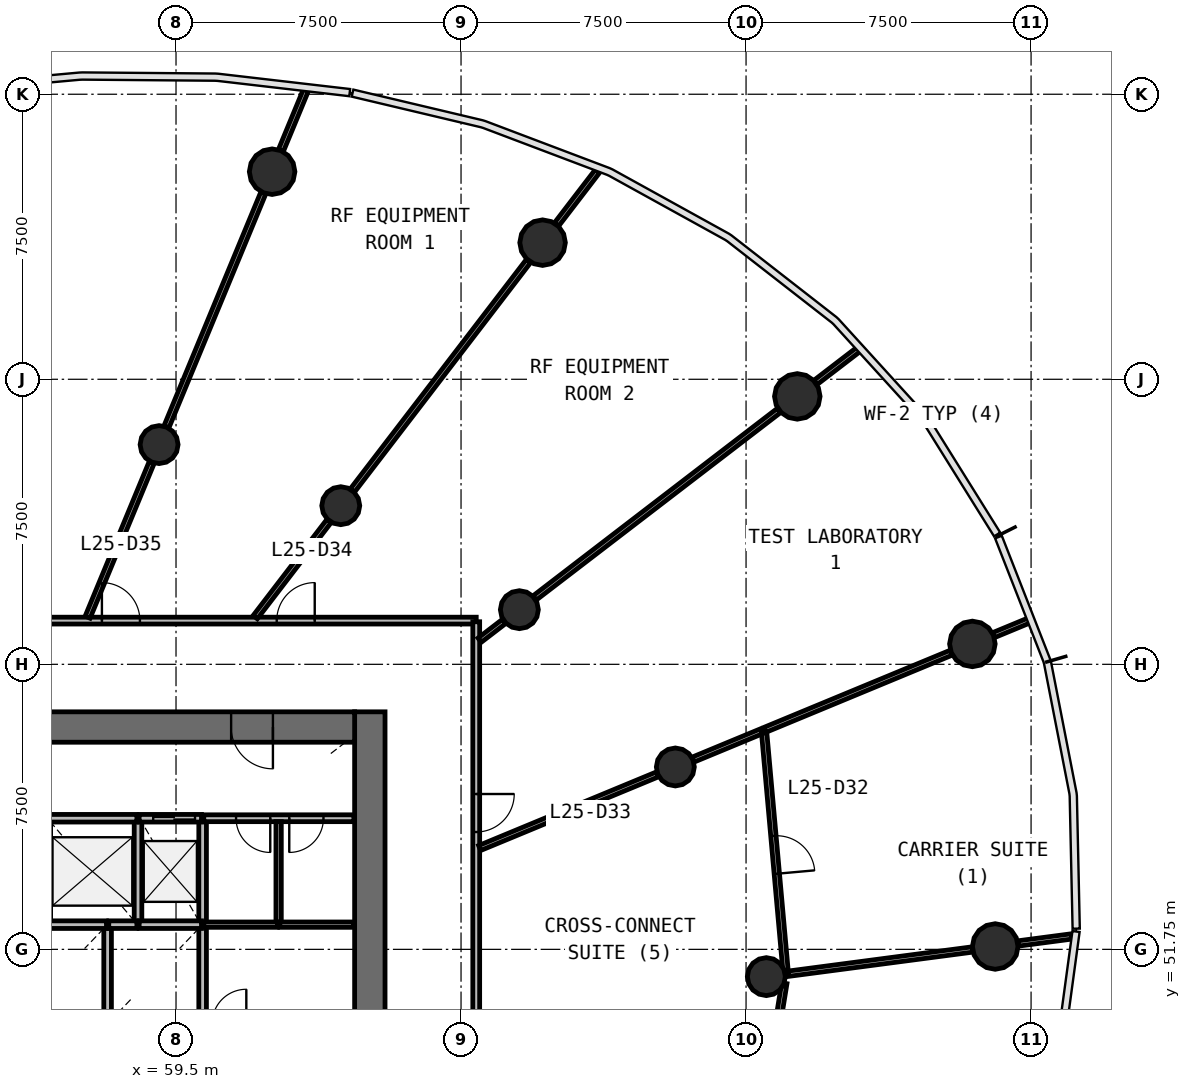
"""IFC4 building model, lengths in metres.
Left out: names, types, materials, properties, quantities, classifications, styles, units other than length and angle.
Written with IfcOpenShell. Run it as: python <this file> out.ifc"""

import sys

from ifc_helpers import new_model, si_unit, direction, frame, frame_2d, origin, origin_2d, place, context, subcontext, project, spatial, rectangle, circle, extrude, source, transform, mapped, element, fill, save


model = new_model("IFC4")
c1 = context("Model", 3, precision=1e-05, world=origin(), true_north=direction((0.0, 1.0)))
c2 = subcontext(c1, "Body", "Model", "MODEL_VIEW")
j1 = project(units=[si_unit("LENGTHUNIT", "METRE"), si_unit("PLANEANGLEUNIT", "RADIAN")], contexts=[c1])
p1 = place(None, origin())
s1 = spatial("IfcSite", under=j1, at=p1, CompositionType="ELEMENT")
p2 = place(p1, origin())
s2 = spatial("IfcBuilding", under=s1, at=p2, CompositionType="ELEMENT")
p3 = place(p2, frame((0.0, 0.0, 108.5)))
s3 = spatial("IfcBuildingStorey", under=s2, at=p3, CompositionType="ELEMENT", Elevation=108.5)
p4 = place(p3, frame((64.6, 38.0, 0.0), z_axis=(0.0, 0.0, 1.0), x_axis=(0.0, 1.0, 0.0)))
e1 = element("IfcWall", 1, at=p4, inside=s3, PredefinedType="SHEAR", context=c2, shape_type="SweptSolid", body=[
    extrude(rectangle(XDim=20.0, YDim=0.8, at=frame_2d((10.0, 0.0))), origin(), (0.0, 0.0, 1.0), 4.1),
])
p5 = place(p4, frame((9.1, 0.0, 0.0)))
e2 = element("IfcOpeningElement", 2, at=p5, cuts=e1, PredefinedType="OPENING", context=c2, shape_type="SweptSolid", body=[
    extrude(rectangle(XDim=1.8, YDim=2.1, at=frame_2d((0.9, 1.05))), frame((0.0, 0.41, 0.0), z_axis=(0.0, -1.0, 0.0), x_axis=(1.0, 0.0, 0.0)), (0.0, 0.0, 1.0), 0.82),
])
p6 = place(p3, frame((64.2, 57.6, 0.0), z_axis=(0.0, 0.0, 1.0), x_axis=(-1.0, 0.0, 0.0)))
e3 = element("IfcWall", 3, at=p6, inside=s3, PredefinedType="SHEAR", context=c2, shape_type="SweptSolid", body=[
    extrude(rectangle(XDim=24.4, YDim=0.8, at=frame_2d((12.2, 0.0))), origin(), (0.0, 0.0, 1.0), 4.1),
])
p7 = place(p6, frame((21.65, 0.0, 0.0)))
e4 = element("IfcOpeningElement", 4, at=p7, cuts=e3, PredefinedType="OPENING", context=c2, shape_type="SweptSolid", body=[
    extrude(rectangle(XDim=1.1, YDim=2.1, at=frame_2d((0.55, 1.05))), frame((0.0, 0.41, 0.0), z_axis=(0.0, -1.0, 0.0), x_axis=(1.0, 0.0, 0.0)), (0.0, 0.0, 1.0), 0.82),
])
p8 = place(p6, frame((2.15, 0.0, 0.0)))
e5 = element("IfcOpeningElement", 5, at=p8, cuts=e3, PredefinedType="OPENING", context=c2, shape_type="SweptSolid", body=[
    extrude(rectangle(XDim=1.1, YDim=2.1, at=frame_2d((0.55, 1.05))), frame((0.0, 0.41, 0.0), z_axis=(0.0, -1.0, 0.0), x_axis=(1.0, 0.0, 0.0)), (0.0, 0.0, 1.0), 0.82),
])
m1 = source(origin(), c2, "Body", "SweptSolid", [
    extrude(circle(Radius=0.6, at=origin_2d()), origin(), (0.0, 0.0, 1.0), 4.1),
])
for number, where, z_axis, x_axis in (
    (6, (81.056, 51.825, 0.0), (0.0, 0.0, 1.0), (1.0, 0.0, 0.0)),
    (7, (80.456, 59.787, 0.0), (0.0, 0.0, 1.0), (1.0, 0.0, 0.0)),
    (8, (75.848, 66.299, 0.0), (0.0, 0.0, 1.0), (1.0, 0.0, 0.0)),
    (9, (69.146, 70.345, 0.0), (0.0, 0.0, 1.0), (1.0, 0.0, 0.0)),
    (10, (62.029, 72.212, 0.0), (0.0, 0.0, 1.0), (1.0, 0.0, 0.0)),
):
    element("IfcColumn", number, at=place(p3, frame(where, z_axis=z_axis, x_axis=x_axis)), inside=s3, PredefinedType="COLUMN", context=c2, shape_type="MappedRepresentation", body=[
        mapped(m1, transform((0.0, 0.0, 0.0), scale=1.0)),
    ])
m2 = source(origin(), c2, "Body", "SweptSolid", [
    extrude(circle(Radius=0.5, at=origin_2d()), origin(), (0.0, 0.0, 1.0), 4.1),
])
for number, where, z_axis, x_axis in (
    (11, (75.034, 51.032, 0.0), (0.0, 0.0, 1.0), (1.0, 0.0, 0.0)),
    (12, (72.639, 56.549, 0.0), (0.0, 0.0, 1.0), (1.0, 0.0, 0.0)),
    (13, (68.535, 60.688, 0.0), (0.0, 0.0, 1.0), (1.0, 0.0, 0.0)),
    (14, (63.835, 63.424, 0.0), (0.0, 0.0, 1.0), (1.0, 0.0, 0.0)),
    (15, (59.055, 65.031, 0.0), (0.0, 0.0, 1.0), (1.0, 0.0, 0.0)),
):
    element("IfcColumn", number, at=place(p3, frame(where, z_axis=z_axis, x_axis=x_axis)), inside=s3, PredefinedType="COLUMN", context=c2, shape_type="MappedRepresentation", body=[
        mapped(m2, transform((0.0, 0.0, 0.0), scale=1.0)),
    ])
for number, where, z_axis, x_axis in (
    (16, (58.5, 52.4, 0.0), (0.0, 0.0, 1.0), (0.0, 1.0, 0.0)),
    (17, (60.2, 52.4, 0.0), (0.0, 0.0, 1.0), (0.0, 1.0, 0.0)),
):
    element("IfcWall", number, at=place(p3, frame(where, z_axis=z_axis, x_axis=x_axis)), inside=s3, PredefinedType="SOLIDWALL", context=c2, shape_type="SweptSolid", body=[
        extrude(rectangle(XDim=2.8, YDim=0.2, at=frame_2d((1.4, 0.0))), origin(), (0.0, 0.0, 1.0), 3.7),
    ])
p9 = place(p3, frame((58.47, 55.2, 0.0), z_axis=(0.0, 0.0, 1.0), x_axis=(-1.0, 0.0, 0.0)))
e18 = element("IfcWall", 18, at=p9, inside=s3, PredefinedType="SOLIDWALL", context=c2, shape_type="SweptSolid", body=[
    extrude(rectangle(XDim=2.34, YDim=0.2, at=frame_2d((1.17, 0.0))), origin(), (0.0, 0.0, 1.0), 3.7),
])
p10 = place(p3, frame((57.7, 50.01, 0.0), z_axis=(0.0, 0.0, 1.0), x_axis=(0.0, 1.0, 0.0)))
e19 = element("IfcWall", 19, at=p10, inside=s3, PredefinedType="SOLIDWALL", context=c2, shape_type="SweptSolid", body=[
    extrude(rectangle(XDim=2.39, YDim=0.2, at=frame_2d((1.195, 0.0))), origin(), (0.0, 0.0, 1.0), 3.7),
])
p11 = place(p3, frame((60.2, 50.01, 0.0), z_axis=(0.0, 0.0, 1.0), x_axis=(0.0, 1.0, 0.0)))
e20 = element("IfcWall", 20, at=p11, inside=s3, PredefinedType="SOLIDWALL", context=c2, shape_type="SweptSolid", body=[
    extrude(rectangle(XDim=2.36, YDim=0.2, at=frame_2d((1.18, 0.0))), origin(), (0.0, 0.0, 1.0), 3.7),
])
p12 = place(p3, frame((60.17, 52.4, 0.0), z_axis=(0.0, 0.0, 1.0), x_axis=(-1.0, 0.0, 0.0)))
e21 = element("IfcWall", 21, at=p12, inside=s3, PredefinedType="SOLIDWALL", context=c2, shape_type="SweptSolid", body=[
    extrude(rectangle(XDim=1.64, YDim=0.2, at=frame_2d((0.82, 0.0))), origin(), (0.0, 0.0, 1.0), 3.7),
])
p13 = place(p3, frame((60.17, 55.2, 0.0), z_axis=(0.0, 0.0, 1.0), x_axis=(-1.0, 0.0, 0.0)))
e22 = element("IfcWall", 22, at=p13, inside=s3, PredefinedType="SOLIDWALL", context=c2, shape_type="SweptSolid", body=[
    extrude(rectangle(XDim=1.64, YDim=0.2, at=frame_2d((0.82, 0.0))), origin(), (0.0, 0.0, 1.0), 3.7),
])
p14 = place(p13, frame((0.17, 0.0, 0.0)))
e23 = element("IfcOpeningElement", 23, at=p14, cuts=e22, PredefinedType="OPENING", context=c2, shape_type="SweptSolid", body=[
    extrude(rectangle(XDim=1.1, YDim=2.1, at=frame_2d((0.55, 1.05))), frame((0.0, 0.11, 0.0), z_axis=(0.0, -1.0, 0.0), x_axis=(1.0, 0.0, 0.0)), (0.0, 0.0, 1.0), 0.22),
])
p15 = place(p3, frame((57.67, 52.4, 0.0), z_axis=(0.0, 0.0, 1.0), x_axis=(-1.0, 0.0, 0.0)))
e24 = element("IfcWall", 24, at=p15, inside=s3, PredefinedType="SOLIDWALL", context=c2, shape_type="SweptSolid", body=[
    extrude(rectangle(XDim=1.54, YDim=0.2, at=frame_2d((0.77, 0.0))), origin(), (0.0, 0.0, 1.0), 3.7),
])
p16 = place(p3, frame((58.47, 52.4, 0.0), z_axis=(0.0, 0.0, 1.0), x_axis=(-1.0, 0.0, 0.0)))
e25 = element("IfcWall", 25, at=p16, inside=s3, PredefinedType="SOLIDWALL", context=c2, shape_type="SweptSolid", body=[
    extrude(rectangle(XDim=0.74, YDim=0.2, at=frame_2d((0.37, 0.0))), origin(), (0.0, 0.0, 1.0), 3.7),
])
p17 = place(p3, frame((36.6, 60.4, 0.0), z_axis=(0.0, 0.0, 1.0), x_axis=(1.0, 0.0, 0.0)))
e26 = element("IfcWall", 26, at=p17, inside=s3, PredefinedType="PARTITIONING", context=c2, shape_type="SweptSolid", body=[
    extrude(rectangle(XDim=30.8, YDim=0.18, at=frame_2d((15.4, 0.0))), origin(), (0.0, 0.0, 1.0), 2.9),
])
p18 = place(p17, frame((25.55, 0.0, 0.0)))
e27 = element("IfcOpeningElement", 27, at=p18, cuts=e26, PredefinedType="OPENING", context=c2, shape_type="SweptSolid", body=[
    extrude(rectangle(XDim=1.0, YDim=2.1, at=frame_2d((0.5, 1.05))), frame((0.0, 0.1, 0.0), z_axis=(0.0, -1.0, 0.0), x_axis=(1.0, 0.0, 0.0)), (0.0, 0.0, 1.0), 0.2),
])
p19 = place(p17, frame((20.95, 0.0, 0.0)))
e28 = element("IfcOpeningElement", 28, at=p19, cuts=e26, PredefinedType="OPENING", context=c2, shape_type="SweptSolid", body=[
    extrude(rectangle(XDim=1.0, YDim=2.1, at=frame_2d((0.5, 1.05))), frame((0.0, 0.1, 0.0), z_axis=(0.0, -1.0, 0.0), x_axis=(1.0, 0.0, 0.0)), (0.0, 0.0, 1.0), 0.2),
])
p20 = place(p17, frame((14.95, 0.0, 0.0)))
e29 = element("IfcOpeningElement", 29, at=p20, cuts=e26, PredefinedType="OPENING", context=c2, shape_type="SweptSolid", body=[
    extrude(rectangle(XDim=1.0, YDim=2.1, at=frame_2d((0.5, 1.05))), frame((0.0, 0.1, 0.0), z_axis=(0.0, -1.0, 0.0), x_axis=(1.0, 0.0, 0.0)), (0.0, 0.0, 1.0), 0.2),
])
p21 = place(p17, frame((8.95, 0.0, 0.0)))
e30 = element("IfcOpeningElement", 30, at=p21, cuts=e26, PredefinedType="OPENING", context=c2, shape_type="SweptSolid", body=[
    extrude(rectangle(XDim=1.0, YDim=2.1, at=frame_2d((0.5, 1.05))), frame((0.0, 0.1, 0.0), z_axis=(0.0, -1.0, 0.0), x_axis=(1.0, 0.0, 0.0)), (0.0, 0.0, 1.0), 0.2),
])
p22 = place(p3, frame((67.4, 60.37, 0.0), z_axis=(0.0, 0.0, 1.0), x_axis=(0.0, -1.0, 0.0)))
e31 = element("IfcWall", 31, at=p22, inside=s3, PredefinedType="PARTITIONING", context=c2, shape_type="SweptSolid", body=[
    extrude(rectangle(XDim=23.583, YDim=0.18, at=frame_2d((11.791, 0.0))), origin(), (0.0, 0.0, 1.0), 2.9),
])
p23 = place(p22, frame((14.732, 0.0, 0.0)))
e32 = element("IfcOpeningElement", 32, at=p23, cuts=e31, PredefinedType="OPENING", context=c2, shape_type="SweptSolid", body=[
    extrude(rectangle(XDim=1.0, YDim=2.1, at=frame_2d((0.5, 1.05))), frame((0.0, 0.1, 0.0), z_axis=(0.0, -1.0, 0.0), x_axis=(1.0, 0.0, 0.0)), (0.0, 0.0, 1.0), 0.2),
])
p24 = place(p22, frame((11.333, 0.0, 0.0)))
e33 = element("IfcOpeningElement", 33, at=p24, cuts=e31, PredefinedType="OPENING", context=c2, shape_type="SweptSolid", body=[
    extrude(rectangle(XDim=1.0, YDim=2.1, at=frame_2d((0.5, 1.05))), frame((0.0, 0.1, 0.0), z_axis=(0.0, -1.0, 0.0), x_axis=(1.0, 0.0, 0.0)), (0.0, 0.0, 1.0), 0.2),
])
p25 = place(p22, frame((4.532, 0.0, 0.0)))
e34 = element("IfcOpeningElement", 34, at=p25, cuts=e31, PredefinedType="OPENING", context=c2, shape_type="SweptSolid", body=[
    extrude(rectangle(XDim=1.0, YDim=2.1, at=frame_2d((0.5, 1.05))), frame((0.0, 0.1, 0.0), z_axis=(0.0, -1.0, 0.0), x_axis=(1.0, 0.0, 0.0)), (0.0, 0.0, 1.0), 0.2),
])
p26 = place(p3, frame((64.18, 55.2, 0.0), z_axis=(0.0, 0.0, 1.0), x_axis=(-1.0, 0.0, 0.0)))
e35 = element("IfcWall", 35, at=p26, inside=s3, PredefinedType="PARTITIONING", context=c2, shape_type="SweptSolid", body=[
    extrude(rectangle(XDim=3.95, YDim=0.18, at=frame_2d((1.975, 0.0))), origin(), (0.0, 0.0, 1.0), 3.7),
])
p27 = place(p26, frame((2.2, 0.0, 0.0)))
e36 = element("IfcOpeningElement", 36, at=p27, cuts=e35, PredefinedType="OPENING", context=c2, shape_type="SweptSolid", body=[
    extrude(rectangle(XDim=0.9, YDim=2.1, at=frame_2d((0.45, 1.05))), frame((0.0, 0.1, 0.0), z_axis=(0.0, -1.0, 0.0), x_axis=(1.0, 0.0, 0.0)), (0.0, 0.0, 1.0), 0.2),
])
p28 = place(p26, frame((0.8, 0.0, 0.0)))
e37 = element("IfcOpeningElement", 37, at=p28, cuts=e35, PredefinedType="OPENING", context=c2, shape_type="SweptSolid", body=[
    extrude(rectangle(XDim=0.9, YDim=2.1, at=frame_2d((0.45, 1.05))), frame((0.0, 0.1, 0.0), z_axis=(0.0, -1.0, 0.0), x_axis=(1.0, 0.0, 0.0)), (0.0, 0.0, 1.0), 0.2),
])
p29 = place(p3, frame((68.935, 60.995, 0.0), z_axis=(0.0, 0.0, 1.0), x_axis=(0.793358692504, 0.608754453805, 0.0)))
e38 = element("IfcWall", 38, at=p29, inside=s3, PredefinedType="PARTITIONING", context=c2, shape_type="SweptSolid", body=[
    extrude(rectangle(XDim=8.11, YDim=0.14, at=frame_2d((4.055, 0.0))), origin(), (0.0, 0.0, 1.0), 2.9),
])
p30 = place(p3, frame((64.142, 63.824, 0.0), z_axis=(0.0, 0.0, 1.0), x_axis=(0.608755907151, 0.793357577331, 0.0)))
e39 = element("IfcWall", 39, at=p30, inside=s3, PredefinedType="PARTITIONING", context=c2, shape_type="SweptSolid", body=[
    extrude(rectangle(XDim=7.615, YDim=0.14, at=frame_2d((3.808, 0.0))), origin(), (0.0, 0.0, 1.0), 2.9),
])
p31 = place(p3, frame((59.248, 65.498, 0.0), z_axis=(0.0, 0.0, 1.0), x_axis=(0.382696989205, 0.923873916968, 0.0)))
e40 = element("IfcWall", 40, at=p31, inside=s3, PredefinedType="PARTITIONING", context=c2, shape_type="SweptSolid", body=[
    extrude(rectangle(XDim=6.663, YDim=0.14, at=frame_2d((3.332, 0.0))), origin(), (0.0, 0.0, 1.0), 2.9),
])
p32 = place(p3, frame((74.97, 57.515, 0.0), z_axis=(0.0, 0.0, 1.0), x_axis=(0.089462467016, -0.995990194227, 0.0)))
e41 = element("IfcWall", 41, at=p32, inside=s3, PredefinedType="PARTITIONING", context=c2, shape_type="SweptSolid", body=[
    extrude(rectangle(XDim=6.44, YDim=0.14, at=frame_2d((3.22, 0.0))), origin(), (0.0, 0.0, 1.0), 2.9),
])
p33 = place(p32, frame((2.791, 0.0, 0.0)))
e42 = element("IfcOpeningElement", 42, at=p33, cuts=e41, PredefinedType="OPENING", context=c2, shape_type="SweptSolid", body=[
    extrude(rectangle(XDim=1.0, YDim=2.1, at=frame_2d((0.5, 1.05))), frame((0.0, 0.08, 0.0), z_axis=(0.0, -1.0, 0.0), x_axis=(1.0, 0.0, 0.0)), (0.0, 0.0, 1.0), 0.16),
])
p34 = place(p3, frame((75.507, 50.858, 0.0), z_axis=(0.0, 0.0, 1.0), x_axis=(-0.160052648202, -0.987108479248, 0.0)))
e43 = element("IfcWall", 43, at=p34, inside=s3, PredefinedType="PARTITIONING", context=c2, shape_type="SweptSolid", body=[
    extrude(rectangle(XDim=5.905, YDim=0.14, at=frame_2d((2.952, 0.0))), origin(), (0.0, 0.0, 1.0), 2.9),
])
p35 = place(p34, frame((2.455, 0.0, 0.0)))
e44 = element("IfcOpeningElement", 44, at=p35, cuts=e43, PredefinedType="OPENING", context=c2, shape_type="SweptSolid", body=[
    extrude(rectangle(XDim=1.0, YDim=2.1, at=frame_2d((0.5, 1.05))), frame((0.0, 0.08, 0.0), z_axis=(0.0, -1.0, 0.0), x_axis=(1.0, 0.0, 0.0)), (0.0, 0.0, 1.0), 0.16),
])
p36 = place(p3, frame((74.998, 57.526, 0.0), z_axis=(0.0, 0.0, 1.0), x_axis=(0.923875965801, 0.382692043051, 0.0)))
e45 = element("IfcWall", 45, at=p36, inside=s3, PredefinedType="PARTITIONING", context=c2, shape_type="SweptSolid", body=[
    extrude(rectangle(XDim=5.302, YDim=0.14, at=frame_2d((2.651, 0.0))), origin(), (0.0, 0.0, 1.0), 2.9),
])
p37 = place(p3, frame((67.49, 54.416, 0.0), z_axis=(0.0, 0.0, 1.0), x_axis=(0.923890025086, 0.382658100067, 0.0)))
e46 = element("IfcWall", 46, at=p37, inside=s3, PredefinedType="PARTITIONING", context=c2, shape_type="SweptSolid", body=[
    extrude(rectangle(XDim=5.068, YDim=0.14, at=frame_2d((2.534, 0.0))), origin(), (0.0, 0.0, 1.0), 2.9),
])
p38 = place(p3, frame((75.616, 51.109, 0.0), z_axis=(0.0, 0.0, 1.0), x_axis=(0.991441867731, 0.130548929177, 0.0)))
e47 = element("IfcWall", 47, at=p38, inside=s3, PredefinedType="PARTITIONING", context=c2, shape_type="SweptSolid", body=[
    extrude(rectangle(XDim=4.883, YDim=0.14, at=frame_2d((2.441, 0.0))), origin(), (0.0, 0.0, 1.0), 2.9),
])
p39 = place(p3, frame((57.174, 60.49, 0.0), z_axis=(0.0, 0.0, 1.0), x_axis=(0.382672831764, 0.923883923353, 0.0)))
e48 = element("IfcWall", 48, at=p39, inside=s3, PredefinedType="PARTITIONING", context=c2, shape_type="SweptSolid", body=[
    extrude(rectangle(XDim=4.41, YDim=0.14, at=frame_2d((2.205, 0.0))), origin(), (0.0, 0.0, 1.0), 2.9),
])
p40 = place(p3, frame((61.584, 60.49, 0.0), z_axis=(0.0, 0.0, 1.0), x_axis=(0.60874605662, 0.793365135703, 0.0)))
e49 = element("IfcWall", 49, at=p40, inside=s3, PredefinedType="PARTITIONING", context=c2, shape_type="SweptSolid", body=[
    extrude(rectangle(XDim=3.194, YDim=0.14, at=frame_2d((1.597, 0.0))), origin(), (0.0, 0.0, 1.0), 2.9),
])
p41 = place(p3, frame((62.2, 52.4, 0.0), z_axis=(0.0, 0.0, 1.0), x_axis=(0.0, 1.0, 0.0)))
e50 = element("IfcWall", 50, at=p41, inside=s3, PredefinedType="PARTITIONING", context=c2, shape_type="SweptSolid", body=[
    extrude(rectangle(XDim=2.71, YDim=0.14, at=frame_2d((1.355, 0.0))), origin(), (0.0, 0.0, 1.0), 2.9),
])
p42 = place(p3, frame((73.106, 56.742, 0.0), z_axis=(0.0, 0.0, 1.0), x_axis=(0.923843914347, 0.382769410904, 0.0)))
e51 = element("IfcWall", 51, at=p42, inside=s3, PredefinedType="PARTITIONING", context=c2, shape_type="SweptSolid", body=[
    extrude(rectangle(XDim=1.945, YDim=0.14, at=frame_2d((0.972, 0.0))), origin(), (0.0, 0.0, 1.0), 2.9),
])
p43 = place(p3, frame((62.17, 52.4, 0.0), z_axis=(0.0, 0.0, 1.0), x_axis=(-1.0, 0.0, 0.0)))
e52 = element("IfcWall", 52, at=p43, inside=s3, PredefinedType="PARTITIONING", context=c2, shape_type="SweptSolid", body=[
    extrude(rectangle(XDim=1.94, YDim=0.14, at=frame_2d((0.97, 0.0))), origin(), (0.0, 0.0, 1.0), 2.9),
])
p44 = place(p3, frame((64.18, 52.4, 0.0), z_axis=(0.0, 0.0, 1.0), x_axis=(-1.0, 0.0, 0.0)))
e53 = element("IfcWall", 53, at=p44, inside=s3, PredefinedType="PARTITIONING", context=c2, shape_type="SweptSolid", body=[
    extrude(rectangle(XDim=1.95, YDim=0.14, at=frame_2d((0.975, 0.0))), origin(), (0.0, 0.0, 1.0), 2.9),
])
p45 = place(p3, frame((69.514, 70.824, 0.0), z_axis=(0.0, 0.0, 1.0), x_axis=(0.608816765526, 0.793310876022, 0.0)))
e54 = element("IfcWall", 54, at=p45, inside=s3, PredefinedType="PARTITIONING", context=c2, shape_type="SweptSolid", body=[
    extrude(rectangle(XDim=1.769, YDim=0.14, at=frame_2d((0.885, 0.0))), origin(), (0.0, 0.0, 1.0), 2.9),
])
p46 = place(p3, frame((62.26, 72.771, 0.0), z_axis=(0.0, 0.0, 1.0), x_axis=(0.382769756697, 0.923843771077, 0.0)))
e55 = element("IfcWall", 55, at=p46, inside=s3, PredefinedType="PARTITIONING", context=c2, shape_type="SweptSolid", body=[
    extrude(rectangle(XDim=1.719, YDim=0.14, at=frame_2d((0.86, 0.0))), origin(), (0.0, 0.0, 1.0), 2.9),
])
p47 = place(p3, frame((76.328, 66.667, 0.0), z_axis=(0.0, 0.0, 1.0), x_axis=(0.793384012646, 0.608721453932, 0.0)))
e56 = element("IfcWall", 56, at=p47, inside=s3, PredefinedType="PARTITIONING", context=c2, shape_type="SweptSolid", body=[
    extrude(rectangle(XDim=1.432, YDim=0.14, at=frame_2d((0.716, 0.0))), origin(), (0.0, 0.0, 1.0), 2.9),
])
p48 = place(p3, frame((81.656, 51.904, 0.0), z_axis=(0.0, 0.0, 1.0), x_axis=(0.991440859851, 0.130556583206, 0.0)))
e57 = element("IfcWall", 57, at=p48, inside=s3, PredefinedType="PARTITIONING", context=c2, shape_type="SweptSolid", body=[
    extrude(rectangle(XDim=1.423, YDim=0.14, at=frame_2d((0.711, 0.0))), origin(), (0.0, 0.0, 1.0), 2.9),
])
p49 = place(p3, frame((81.014, 60.018, 0.0), z_axis=(0.0, 0.0, 1.0), x_axis=(0.923909071339, 0.38261211154, 0.0)))
e58 = element("IfcWall", 58, at=p49, inside=s3, PredefinedType="PARTITIONING", context=c2, shape_type="SweptSolid", body=[
    extrude(rectangle(XDim=1.021, YDim=0.14, at=frame_2d((0.511, 0.0))), origin(), (0.0, 0.0, 1.0), 2.9),
])
p50 = place(p3, frame((67.49, 59.886, 0.0), z_axis=(0.0, 0.0, 1.0), x_axis=(0.793316076519, 0.608809989025, 0.0)))
e59 = element("IfcWall", 59, at=p50, inside=s3, PredefinedType="PARTITIONING", context=c2, shape_type="SweptSolid", body=[
    extrude(rectangle(XDim=0.812, YDim=0.14, at=frame_2d((0.406, 0.0))), origin(), (0.0, 0.0, 1.0), 2.9),
])
m3 = source(origin(), c2, "Body", "SweptSolid", [
    extrude(rectangle(XDim=1.1, YDim=2.1, at=frame_2d((0.55, 1.05))), frame((0.0, 0.025, 0.0), z_axis=(0.0, -1.0, 0.0), x_axis=(1.0, 0.0, 0.0)), (0.0, 0.0, 1.0), 0.05),
])
p51 = place(p14, origin())
e60 = element("IfcDoor", 60, at=p51, inside=s3, OperationType="DOUBLE_DOOR_SLIDING", PredefinedType="USERDEFINED", context=c2, shape_type="MappedRepresentation", body=[
    mapped(m3, transform((0.0, 0.0, 0.0), scale=1.0)),
])
fill(e23, e60)
m4 = source(origin(), c2, "Body", "SweptSolid", [
    extrude(rectangle(XDim=1.1, YDim=2.1, at=frame_2d((0.55, 1.05))), frame((0.0, 0.025, 0.0), z_axis=(0.0, -1.0, 0.0), x_axis=(1.0, 0.0, 0.0)), (0.0, 0.0, 1.0), 0.05),
])
p52 = place(p8, origin())
e61 = element("IfcDoor", 61, at=p52, inside=s3, OperationType="SINGLE_SWING_LEFT", PredefinedType="DOOR", context=c2, shape_type="MappedRepresentation", body=[
    mapped(m4, transform((0.0, 0.0, 0.0), scale=1.0)),
])
fill(e5, e61)
m5 = source(origin(), c2, "Body", "SweptSolid", [
    extrude(rectangle(XDim=1.0, YDim=2.1, at=frame_2d((0.5, 1.05))), frame((0.0, 0.025, 0.0), z_axis=(0.0, -1.0, 0.0), x_axis=(1.0, 0.0, 0.0)), (0.0, 0.0, 1.0), 0.05),
])
p53 = place(p33, origin())
e62 = element("IfcDoor", 62, at=p53, inside=s3, OperationType="SINGLE_SWING_RIGHT", PredefinedType="DOOR", context=c2, shape_type="MappedRepresentation", body=[
    mapped(m5, transform((0.0, 0.0, 0.0), scale=1.0)),
])
fill(e42, e62)
p54 = place(p25, origin())
e63 = element("IfcDoor", 63, at=p54, inside=s3, OperationType="SINGLE_SWING_LEFT", PredefinedType="DOOR", context=c2, shape_type="MappedRepresentation", body=[
    mapped(m5, transform((0.0, 0.0, 0.0), scale=1.0)),
])
fill(e34, e63)
p55 = place(p18, origin())
e64 = element("IfcDoor", 64, at=p55, inside=s3, OperationType="SINGLE_SWING_RIGHT", PredefinedType="DOOR", context=c2, shape_type="MappedRepresentation", body=[
    mapped(m5, transform((0.0, 0.0, 0.0), scale=1.0)),
])
fill(e27, e64)
p56 = place(p19, origin())
e65 = element("IfcDoor", 65, at=p56, inside=s3, OperationType="SINGLE_SWING_LEFT", PredefinedType="DOOR", context=c2, shape_type="MappedRepresentation", body=[
    mapped(m5, transform((0.0, 0.0, 0.0), scale=1.0)),
])
fill(e28, e65)
m6 = source(origin(), c2, "Body", "SweptSolid", [
    extrude(rectangle(XDim=0.9, YDim=2.1, at=frame_2d((0.45, 1.05))), frame((0.0, 0.025, 0.0), z_axis=(0.0, -1.0, 0.0), x_axis=(1.0, 0.0, 0.0)), (0.0, 0.0, 1.0), 0.05),
])
p57 = place(p27, origin())
e66 = element("IfcDoor", 66, at=p57, inside=s3, OperationType="SINGLE_SWING_LEFT", PredefinedType="DOOR", context=c2, shape_type="MappedRepresentation", body=[
    mapped(m6, transform((0.0, 0.0, 0.0), scale=1.0)),
])
fill(e36, e66)
p58 = place(p28, origin())
e67 = element("IfcDoor", 67, at=p58, inside=s3, OperationType="SINGLE_SWING_RIGHT", PredefinedType="DOOR", context=c2, shape_type="MappedRepresentation", body=[
    mapped(m6, transform((0.0, 0.0, 0.0), scale=1.0)),
])
fill(e37, e67)
save(model, sys.argv[1])
